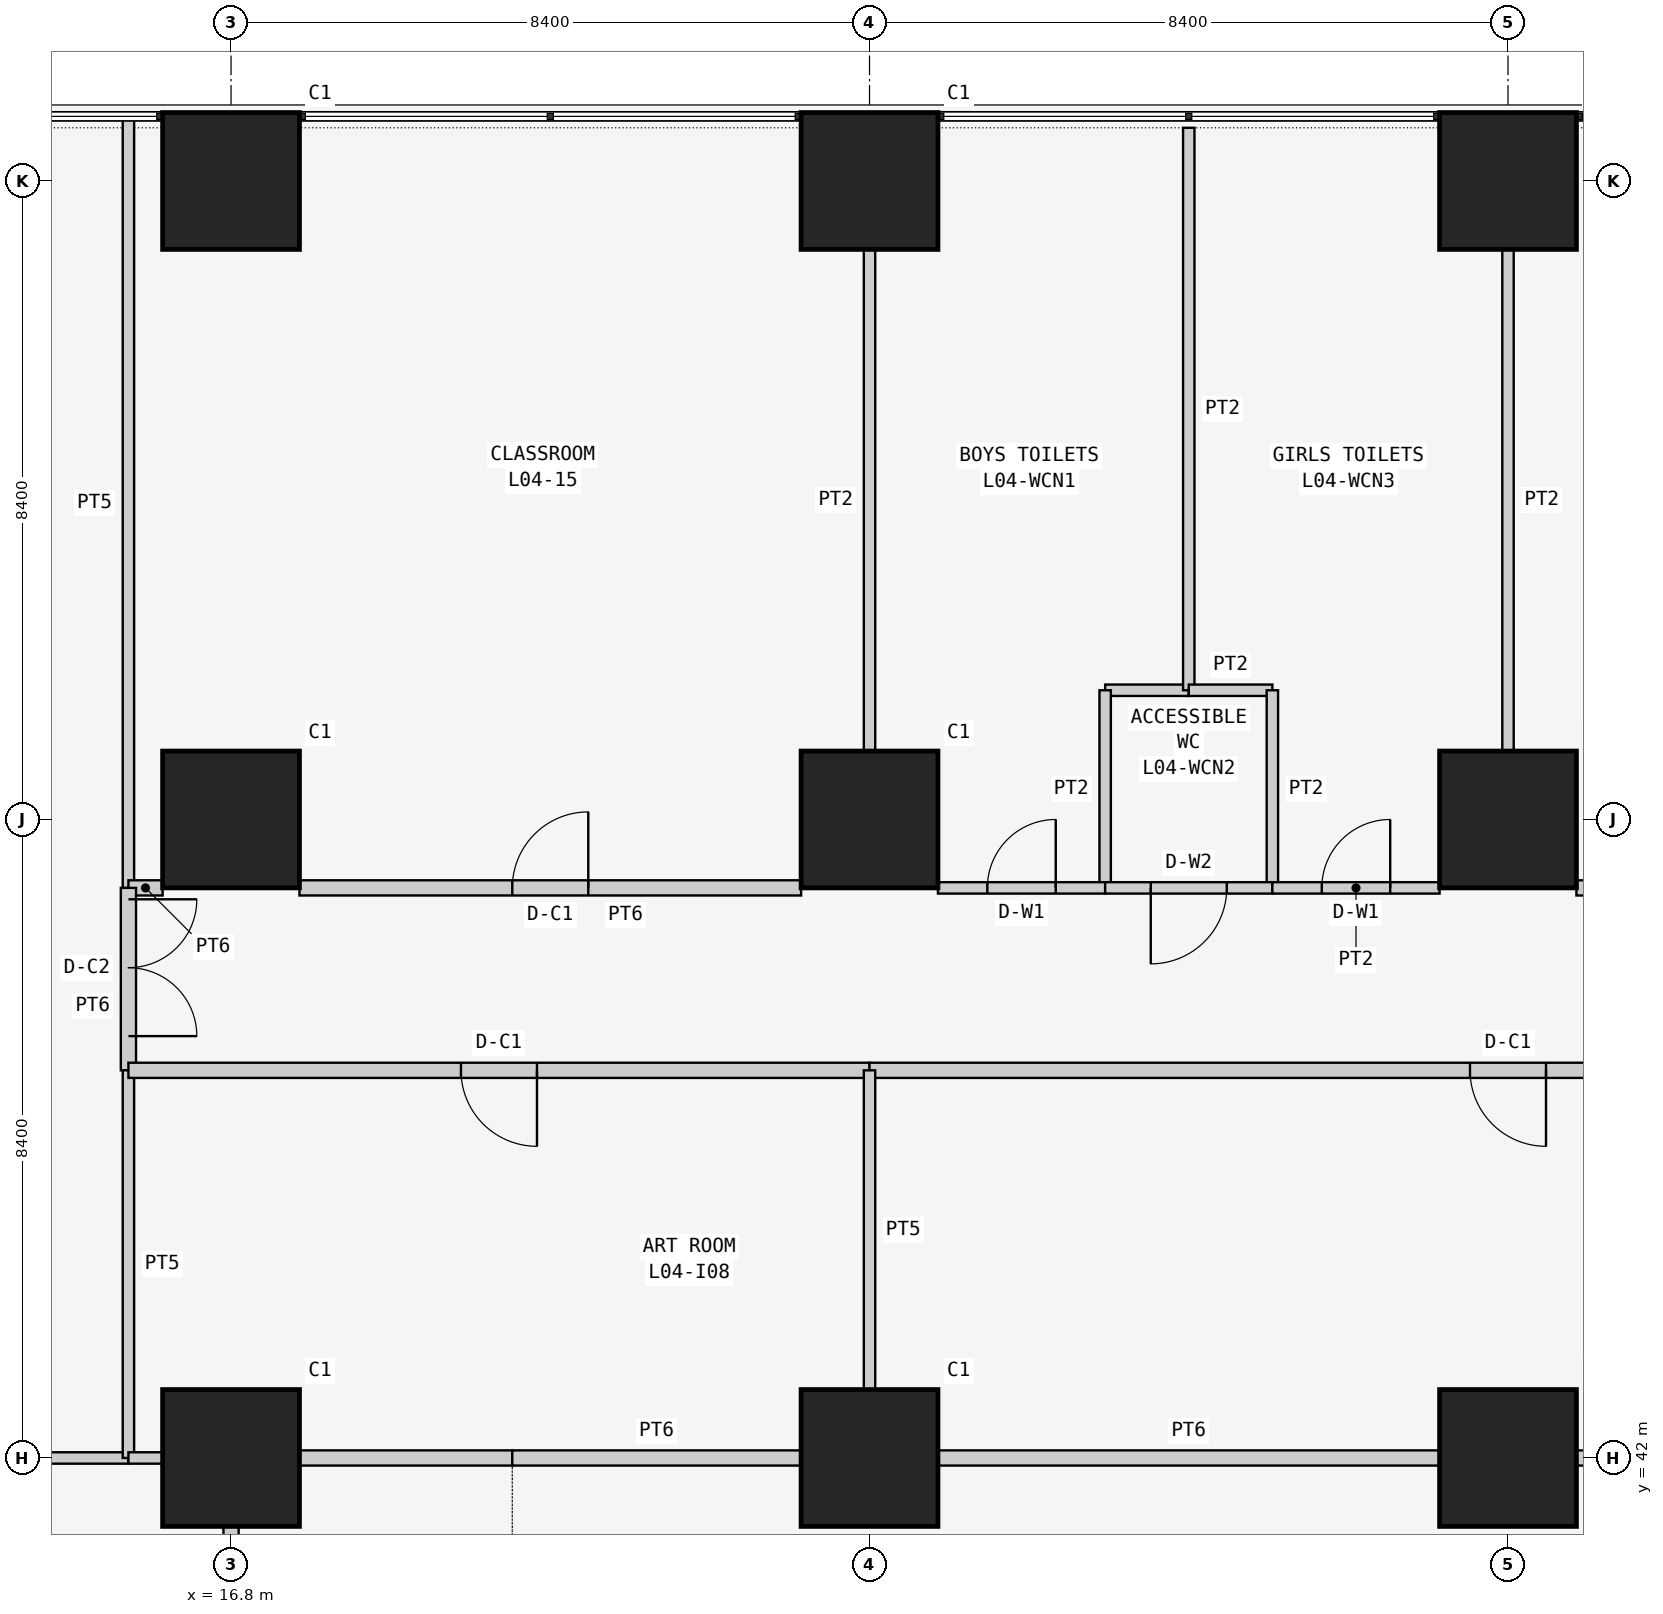
"""IFC4 building model, lengths in metres.
Left out: names, types, materials, properties, quantities, classifications, styles, units other than length and angle.
Written with IfcOpenShell. Run it as: python <this file> out.ifc"""

import sys

from ifc_helpers import new_model, si_unit, direction, frame, frame_2d, origin, origin_2d, place, context, subcontext, project, spatial, rectangle, extrude, element, fill, save


model = new_model("IFC4")
c1 = context("Model", 3, precision=1e-05, world=origin(), true_north=direction((0.0, 1.0)))
c2 = subcontext(c1, "Body", "Model", "MODEL_VIEW")
j1 = project(units=[si_unit("LENGTHUNIT", "METRE"), si_unit("PLANEANGLEUNIT", "RADIAN")], contexts=[c1])
p1 = place(None, origin())
s1 = spatial("IfcSite", under=j1, at=p1, CompositionType="ELEMENT")
p2 = place(p1, origin())
s2 = spatial("IfcBuilding", under=s1, at=p2, CompositionType="ELEMENT")
p3 = place(p2, frame((0.0, 0.0, 19.5)))
s3 = spatial("IfcBuildingStorey", under=s2, at=p3, CompositionType="ELEMENT", Elevation=19.5)
for number, where, z_axis, x_axis in (
    (1, (16.8, 42.0, 0.0), (0.0, 0.0, 1.0), (1.0, 0.0, 0.0)),
    (2, (16.8, 50.4, 0.0), (0.0, 0.0, 1.0), (1.0, 0.0, 0.0)),
    (3, (16.8, 58.8, 0.0), (0.0, 0.0, 1.0), (1.0, 0.0, 0.0)),
    (4, (25.2, 42.0, 0.0), (0.0, 0.0, 1.0), (1.0, 0.0, 0.0)),
    (5, (25.2, 50.4, 0.0), (0.0, 0.0, 1.0), (1.0, 0.0, 0.0)),
    (6, (25.2, 58.8, 0.0), (0.0, 0.0, 1.0), (1.0, 0.0, 0.0)),
    (7, (33.6, 42.0, 0.0), (0.0, 0.0, 1.0), (1.0, 0.0, 0.0)),
    (8, (33.6, 50.4, 0.0), (0.0, 0.0, 1.0), (1.0, 0.0, 0.0)),
    (9, (33.6, 58.8, 0.0), (0.0, 0.0, 1.0), (1.0, 0.0, 0.0)),
):
    element("IfcColumn", number, at=place(p3, frame(where, z_axis=z_axis, x_axis=x_axis)), inside=s3, PredefinedType="COLUMN", context=c2, shape_type="SweptSolid", body=[
        extrude(rectangle(XDim=1.8, YDim=1.8, at=origin_2d()), origin(), (0.0, 0.0, 1.0), 4.5),
    ])
p4 = place(p3, frame((29.4, 52.1, 0.0), z_axis=(0.0, 0.0, 1.0), x_axis=(-1.0, 0.0, 0.0)))
e10 = element("IfcWall", 10, at=p4, inside=s3, PredefinedType="PARTITIONING", context=c2, shape_type="SweptSolid", body=[
    extrude(rectangle(XDim=1.1, YDim=0.15, at=frame_2d((0.55, 0.0))), origin(), (0.0, 0.0, 1.0), 4.3),
])
p5 = place(p3, frame((28.3, 52.1, 0.0), z_axis=(0.0, 0.0, 1.0), x_axis=(0.0, -1.0, 0.0)))
e11 = element("IfcWall", 11, at=p5, inside=s3, PredefinedType="PARTITIONING", context=c2, shape_type="SweptSolid", body=[
    extrude(rectangle(XDim=2.6, YDim=0.15, at=frame_2d((1.3, 0.0))), origin(), (0.0, 0.0, 1.0), 4.3),
])
p6 = place(p3, frame((29.4, 59.5, 0.0), z_axis=(0.0, 0.0, 1.0), x_axis=(0.0, -1.0, 0.0)))
e12 = element("IfcWall", 12, at=p6, inside=s3, PredefinedType="PARTITIONING", context=c2, shape_type="SweptSolid", body=[
    extrude(rectangle(XDim=7.4, YDim=0.15, at=frame_2d((3.7, 0.0))), origin(), (0.0, 0.0, 1.0), 3.688),
])
p7 = place(p3, frame((25.2, 51.3, 0.0), z_axis=(0.0, 0.0, 1.0), x_axis=(0.0, 1.0, 0.0)))
e13 = element("IfcWall", 13, at=p7, inside=s3, PredefinedType="PARTITIONING", context=c2, shape_type="SweptSolid", body=[
    extrude(rectangle(XDim=6.6, YDim=0.15, at=frame_2d((3.3, 0.0))), origin(), (0.0, 0.0, 1.0), 3.543),
])
p8 = place(p3, frame((28.3, 49.5, 0.0), z_axis=(0.0, 0.0, 1.0), x_axis=(-1.0, 0.0, 0.0)))
e14 = element("IfcWall", 14, at=p8, inside=s3, PredefinedType="PARTITIONING", context=c2, shape_type="SweptSolid", body=[
    extrude(rectangle(XDim=2.2, YDim=0.15, at=frame_2d((1.1, 0.0))), origin(), (0.0, 0.0, 1.0), 4.3),
])
p9 = place(p8, frame((0.65, 0.0, 0.0)))
e15 = element("IfcOpeningElement", 15, at=p9, cuts=e14, PredefinedType="OPENING", context=c2, shape_type="SweptSolid", body=[
    extrude(rectangle(XDim=0.9, YDim=2.1, at=frame_2d((0.45, 1.05))), frame((0.0, 0.085, 0.0), z_axis=(0.0, -1.0, 0.0), x_axis=(1.0, 0.0, 0.0)), (0.0, 0.0, 1.0), 0.17),
])
p10 = place(p3, frame((29.4, 52.1, 0.0), z_axis=(0.0, 0.0, 1.0), x_axis=(1.0, 0.0, 0.0)))
e16 = element("IfcWall", 16, at=p10, inside=s3, PredefinedType="PARTITIONING", context=c2, shape_type="SweptSolid", body=[
    extrude(rectangle(XDim=1.1, YDim=0.15, at=frame_2d((0.55, 0.0))), origin(), (0.0, 0.0, 1.0), 4.3),
])
p11 = place(p3, frame((30.5, 52.1, 0.0), z_axis=(0.0, 0.0, 1.0), x_axis=(0.0, -1.0, 0.0)))
e17 = element("IfcWall", 17, at=p11, inside=s3, PredefinedType="PARTITIONING", context=c2, shape_type="SweptSolid", body=[
    extrude(rectangle(XDim=2.6, YDim=0.15, at=frame_2d((1.3, 0.0))), origin(), (0.0, 0.0, 1.0), 4.3),
])
p12 = place(p3, frame((30.5, 49.5, 0.0), z_axis=(0.0, 0.0, 1.0), x_axis=(-1.0, 0.0, 0.0)))
e18 = element("IfcWall", 18, at=p12, inside=s3, PredefinedType="PARTITIONING", context=c2, shape_type="SweptSolid", body=[
    extrude(rectangle(XDim=2.2, YDim=0.15, at=frame_2d((1.1, 0.0))), origin(), (0.0, 0.0, 1.0), 4.3),
])
p13 = place(p12, frame((0.6, 0.0, 0.0)))
e19 = element("IfcOpeningElement", 19, at=p13, cuts=e18, PredefinedType="OPENING", context=c2, shape_type="SweptSolid", body=[
    extrude(rectangle(XDim=1.0, YDim=2.1, at=frame_2d((0.5, 1.05))), frame((0.0, 0.085, 0.0), z_axis=(0.0, -1.0, 0.0), x_axis=(1.0, 0.0, 0.0)), (0.0, 0.0, 1.0), 0.17),
])
p14 = place(p3, frame((33.6, 57.9, 0.0), z_axis=(0.0, 0.0, 1.0), x_axis=(0.0, -1.0, 0.0)))
e20 = element("IfcWall", 20, at=p14, inside=s3, PredefinedType="PARTITIONING", context=c2, shape_type="SweptSolid", body=[
    extrude(rectangle(XDim=6.6, YDim=0.15, at=frame_2d((3.3, 0.0))), origin(), (0.0, 0.0, 1.0), 3.543),
])
p15 = place(p3, frame((32.7, 49.5, 0.0), z_axis=(0.0, 0.0, 1.0), x_axis=(-1.0, 0.0, 0.0)))
e21 = element("IfcWall", 21, at=p15, inside=s3, PredefinedType="PARTITIONING", context=c2, shape_type="SweptSolid", body=[
    extrude(rectangle(XDim=2.2, YDim=0.15, at=frame_2d((1.1, 0.0))), origin(), (0.0, 0.0, 1.0), 4.3),
])
p16 = place(p15, frame((0.65, 0.0, 0.0)))
e22 = element("IfcOpeningElement", 22, at=p16, cuts=e21, PredefinedType="OPENING", context=c2, shape_type="SweptSolid", body=[
    extrude(rectangle(XDim=0.9, YDim=2.1, at=frame_2d((0.45, 1.05))), frame((0.0, 0.085, 0.0), z_axis=(0.0, -1.0, 0.0), x_axis=(1.0, 0.0, 0.0)), (0.0, 0.0, 1.0), 0.17),
])
p17 = place(p3, frame((15.45, 49.5, 0.0), z_axis=(0.0, 0.0, 1.0), x_axis=(0.0, 1.0, 0.0)))
e23 = element("IfcWall", 23, at=p17, inside=s3, PredefinedType="PARTITIONING", context=c2, shape_type="SweptSolid", body=[
    extrude(rectangle(XDim=10.126, YDim=0.15, at=frame_2d((5.063, 0.0))), origin(), (0.0, 0.0, 1.0), 4.3),
])
p18 = place(p3, frame((15.9, 49.5, 0.0), z_axis=(0.0, 0.0, 1.0), x_axis=(-1.0, 0.0, 0.0)))
e24 = element("IfcWall", 24, at=p18, inside=s3, PredefinedType="PARTITIONING", context=c2, shape_type="SweptSolid", body=[
    extrude(rectangle(XDim=0.45, YDim=0.2, at=frame_2d((0.225, 0.0))), origin(), (0.0, 0.0, 1.0), 4.3),
])
p19 = place(p3, frame((24.3, 49.5, 0.0), z_axis=(0.0, 0.0, 1.0), x_axis=(-1.0, 0.0, 0.0)))
e25 = element("IfcWall", 25, at=p19, inside=s3, PredefinedType="PARTITIONING", context=c2, shape_type="SweptSolid", body=[
    extrude(rectangle(XDim=6.6, YDim=0.2, at=frame_2d((3.3, 0.0))), origin(), (0.0, 0.0, 1.0), 4.3),
])
p20 = place(p19, frame((2.8, 0.0, 0.0)))
e26 = element("IfcOpeningElement", 26, at=p20, cuts=e25, PredefinedType="OPENING", context=c2, shape_type="SweptSolid", body=[
    extrude(rectangle(XDim=1.0, YDim=2.1, at=frame_2d((0.5, 1.05))), frame((0.0, 0.11, 0.0), z_axis=(0.0, -1.0, 0.0), x_axis=(1.0, 0.0, 0.0)), (0.0, 0.0, 1.0), 0.22),
])
p21 = place(p3, frame((41.1, 49.5, 0.0), z_axis=(0.0, 0.0, 1.0), x_axis=(-1.0, 0.0, 0.0)))
e27 = element("IfcWall", 27, at=p21, inside=s3, PredefinedType="PARTITIONING", context=c2, shape_type="SweptSolid", body=[
    extrude(rectangle(XDim=6.6, YDim=0.2, at=frame_2d((3.3, 0.0))), origin(), (0.0, 0.0, 1.0), 4.3),
])
p22 = place(p21, frame((2.8, 0.0, 0.0)))
e28 = element("IfcOpeningElement", 28, at=p22, cuts=e27, PredefinedType="OPENING", context=c2, shape_type="SweptSolid", body=[
    extrude(rectangle(XDim=1.0, YDim=2.1, at=frame_2d((0.5, 1.05))), frame((0.0, 0.11, 0.0), z_axis=(0.0, -1.0, 0.0), x_axis=(1.0, 0.0, 0.0)), (0.0, 0.0, 1.0), 0.22),
])
p23 = place(p3, frame((15.45, 49.5, 0.0), z_axis=(0.0, 0.0, 1.0), x_axis=(0.0, -1.0, 0.0)))
e29 = element("IfcWall", 29, at=p23, inside=s3, PredefinedType="PARTITIONING", context=c2, shape_type="SweptSolid", body=[
    extrude(rectangle(XDim=2.4, YDim=0.2, at=frame_2d((1.2, 0.0))), origin(), (0.0, 0.0, 1.0), 4.3),
])
p24 = place(p23, frame((0.15, 0.0, 0.0)))
e30 = element("IfcOpeningElement", 30, at=p24, cuts=e29, PredefinedType="OPENING", context=c2, shape_type="SweptSolid", body=[
    extrude(rectangle(XDim=1.8, YDim=2.4, at=frame_2d((0.9, 1.2))), frame((0.0, 0.11, 0.0), z_axis=(0.0, -1.0, 0.0), x_axis=(1.0, 0.0, 0.0)), (0.0, 0.0, 1.0), 0.22),
])
p25 = place(p3, frame((15.45, 42.0, 0.0), z_axis=(0.0, 0.0, 1.0), x_axis=(-1.0, 0.0, 0.0)))
e31 = element("IfcWall", 31, at=p25, inside=s3, PredefinedType="PARTITIONING", context=c2, shape_type="SweptSolid", body=[
    extrude(rectangle(XDim=3.75, YDim=0.15, at=frame_2d((1.875, 0.0))), origin(), (0.0, 0.0, 1.0), 3.543),
])
p26 = place(p3, frame((15.45, 47.1, 0.0), z_axis=(0.0, 0.0, 1.0), x_axis=(0.0, -1.0, 0.0)))
e32 = element("IfcWall", 32, at=p26, inside=s3, PredefinedType="PARTITIONING", context=c2, shape_type="SweptSolid", body=[
    extrude(rectangle(XDim=5.1, YDim=0.15, at=frame_2d((2.55, 0.0))), origin(), (0.0, 0.0, 1.0), 4.3),
])
p27 = place(p3, frame((25.2, 47.1, 0.0), z_axis=(0.0, 0.0, 1.0), x_axis=(-1.0, 0.0, 0.0)))
e33 = element("IfcWall", 33, at=p27, inside=s3, PredefinedType="PARTITIONING", context=c2, shape_type="SweptSolid", body=[
    extrude(rectangle(XDim=9.75, YDim=0.2, at=frame_2d((4.875, 0.0))), origin(), (0.0, 0.0, 1.0), 4.3),
])
p28 = place(p27, frame((4.375, 0.0, 0.0)))
e34 = element("IfcOpeningElement", 34, at=p28, cuts=e33, PredefinedType="OPENING", context=c2, shape_type="SweptSolid", body=[
    extrude(rectangle(XDim=1.0, YDim=2.1, at=frame_2d((0.5, 1.05))), frame((0.0, 0.11, 0.0), z_axis=(0.0, -1.0, 0.0), x_axis=(1.0, 0.0, 0.0)), (0.0, 0.0, 1.0), 0.22),
])
p29 = place(p3, frame((42.0, 47.1, 0.0), z_axis=(0.0, 0.0, 1.0), x_axis=(-1.0, 0.0, 0.0)))
e35 = element("IfcWall", 35, at=p29, inside=s3, PredefinedType="PARTITIONING", context=c2, shape_type="SweptSolid", body=[
    extrude(rectangle(XDim=16.8, YDim=0.2, at=frame_2d((8.4, 0.0))), origin(), (0.0, 0.0, 1.0), 4.3),
])
p30 = place(p29, frame((7.9, 0.0, 0.0)))
e36 = element("IfcOpeningElement", 36, at=p30, cuts=e35, PredefinedType="OPENING", context=c2, shape_type="SweptSolid", body=[
    extrude(rectangle(XDim=1.0, YDim=2.1, at=frame_2d((0.5, 1.05))), frame((0.0, 0.11, 0.0), z_axis=(0.0, -1.0, 0.0), x_axis=(1.0, 0.0, 0.0)), (0.0, 0.0, 1.0), 0.22),
])
p31 = place(p3, frame((16.8, 34.5, 0.0), z_axis=(0.0, 0.0, 1.0), x_axis=(0.0, 1.0, 0.0)))
e37 = element("IfcWall", 37, at=p31, inside=s3, PredefinedType="PARTITIONING", context=c2, shape_type="SweptSolid", body=[
    extrude(rectangle(XDim=6.6, YDim=0.2, at=frame_2d((3.3, 0.0))), origin(), (0.0, 0.0, 1.0), 3.543),
])
p32 = place(p3, frame((17.7, 42.0, 0.0), z_axis=(0.0, 0.0, 1.0), x_axis=(1.0, 0.0, 0.0)))
e38 = element("IfcWall", 38, at=p32, inside=s3, PredefinedType="PARTITIONING", context=c2, shape_type="SweptSolid", body=[
    extrude(rectangle(XDim=2.8, YDim=0.2, at=frame_2d((1.4, 0.0))), origin(), (0.0, 0.0, 1.0), 3.543),
])
p33 = place(p3, frame((20.5, 42.0, 0.0), z_axis=(0.0, 0.0, 1.0), x_axis=(1.0, 0.0, 0.0)))
e39 = element("IfcWall", 39, at=p33, inside=s3, PredefinedType="PARTITIONING", context=c2, shape_type="SweptSolid", body=[
    extrude(rectangle(XDim=3.8, YDim=0.2, at=frame_2d((1.9, 0.0))), origin(), (0.0, 0.0, 1.0), 3.543),
])
p34 = place(p3, frame((26.1, 42.0, 0.0), z_axis=(0.0, 0.0, 1.0), x_axis=(1.0, 0.0, 0.0)))
e40 = element("IfcWall", 40, at=p34, inside=s3, PredefinedType="PARTITIONING", context=c2, shape_type="SweptSolid", body=[
    extrude(rectangle(XDim=6.6, YDim=0.2, at=frame_2d((3.3, 0.0))), origin(), (0.0, 0.0, 1.0), 3.543),
])
p35 = place(p3, frame((34.5, 42.0, 0.0), z_axis=(0.0, 0.0, 1.0), x_axis=(1.0, 0.0, 0.0)))
e41 = element("IfcWall", 41, at=p35, inside=s3, PredefinedType="PARTITIONING", context=c2, shape_type="SweptSolid", body=[
    extrude(rectangle(XDim=6.6, YDim=0.2, at=frame_2d((3.3, 0.0))), origin(), (0.0, 0.0, 1.0), 3.543),
])
p36 = place(p3, frame((15.45, 42.0, 0.0), z_axis=(0.0, 0.0, 1.0), x_axis=(1.0, 0.0, 0.0)))
e42 = element("IfcWall", 42, at=p36, inside=s3, PredefinedType="PARTITIONING", context=c2, shape_type="SweptSolid", body=[
    extrude(rectangle(XDim=0.45, YDim=0.15, at=frame_2d((0.225, 0.0))), origin(), (0.0, 0.0, 1.0), 3.543),
])
p37 = place(p3, frame((25.2, 47.1, 0.0), z_axis=(0.0, 0.0, 1.0), x_axis=(0.0, -1.0, 0.0)))
e43 = element("IfcWall", 43, at=p37, inside=s3, PredefinedType="PARTITIONING", context=c2, shape_type="SweptSolid", body=[
    extrude(rectangle(XDim=4.2, YDim=0.15, at=frame_2d((2.1, 0.0))), origin(), (0.0, 0.0, 1.0), 3.543),
])
p38 = place(p9, frame((0.9, 0.0, 0.0), z_axis=(0.0, 0.0, 1.0), x_axis=(-1.0, 0.0, 0.0)))
e44 = element("IfcDoor", 44, at=p38, inside=s3, OperationType="SINGLE_SWING_RIGHT", PredefinedType="DOOR", context=c2, shape_type="SweptSolid", body=[
    extrude(rectangle(XDim=0.9, YDim=2.1, at=frame_2d((0.45, 1.05))), frame((0.0, 0.025, 0.0), z_axis=(0.0, -1.0, 0.0), x_axis=(1.0, 0.0, 0.0)), (0.0, 0.0, 1.0), 0.05),
])
fill(e15, e44)
p39 = place(p13, origin())
e45 = element("IfcDoor", 45, at=p39, inside=s3, OperationType="SINGLE_SWING_RIGHT", PredefinedType="DOOR", context=c2, shape_type="SweptSolid", body=[
    extrude(rectangle(XDim=1.0, YDim=2.1, at=frame_2d((0.5, 1.05))), frame((0.0, 0.025, 0.0), z_axis=(0.0, -1.0, 0.0), x_axis=(1.0, 0.0, 0.0)), (0.0, 0.0, 1.0), 0.05),
])
fill(e19, e45)
p40 = place(p16, frame((0.9, 0.0, 0.0), z_axis=(0.0, 0.0, 1.0), x_axis=(-1.0, 0.0, 0.0)))
e46 = element("IfcDoor", 46, at=p40, inside=s3, OperationType="SINGLE_SWING_RIGHT", PredefinedType="DOOR", context=c2, shape_type="SweptSolid", body=[
    extrude(rectangle(XDim=0.9, YDim=2.1, at=frame_2d((0.45, 1.05))), frame((0.0, 0.025, 0.0), z_axis=(0.0, -1.0, 0.0), x_axis=(1.0, 0.0, 0.0)), (0.0, 0.0, 1.0), 0.05),
])
fill(e22, e46)
p41 = place(p20, frame((1.0, 0.0, 0.0), z_axis=(0.0, 0.0, 1.0), x_axis=(-1.0, 0.0, 0.0)))
e47 = element("IfcDoor", 47, at=p41, inside=s3, OperationType="SINGLE_SWING_RIGHT", PredefinedType="DOOR", context=c2, shape_type="SweptSolid", body=[
    extrude(rectangle(XDim=1.0, YDim=2.1, at=frame_2d((0.5, 1.05))), frame((0.0, 0.025, 0.0), z_axis=(0.0, -1.0, 0.0), x_axis=(1.0, 0.0, 0.0)), (0.0, 0.0, 1.0), 0.05),
])
fill(e26, e47)
p42 = place(p24, origin())
e48 = element("IfcDoor", 48, at=p42, inside=s3, OperationType="DOUBLE_DOOR_SINGLE_SWING", PredefinedType="DOOR", context=c2, shape_type="SweptSolid", body=[
    extrude(rectangle(XDim=1.8, YDim=2.4, at=frame_2d((0.9, 1.2))), frame((0.0, 0.025, 0.0), z_axis=(0.0, -1.0, 0.0), x_axis=(1.0, 0.0, 0.0)), (0.0, 0.0, 1.0), 0.05),
])
fill(e30, e48)
p43 = place(p28, origin())
e49 = element("IfcDoor", 49, at=p43, inside=s3, OperationType="SINGLE_SWING_LEFT", PredefinedType="DOOR", context=c2, shape_type="SweptSolid", body=[
    extrude(rectangle(XDim=1.0, YDim=2.1, at=frame_2d((0.5, 1.05))), frame((0.0, 0.025, 0.0), z_axis=(0.0, -1.0, 0.0), x_axis=(1.0, 0.0, 0.0)), (0.0, 0.0, 1.0), 0.05),
])
fill(e34, e49)
p44 = place(p30, origin())
e50 = element("IfcDoor", 50, at=p44, inside=s3, OperationType="SINGLE_SWING_LEFT", PredefinedType="DOOR", context=c2, shape_type="SweptSolid", body=[
    extrude(rectangle(XDim=1.0, YDim=2.1, at=frame_2d((0.5, 1.05))), frame((0.0, 0.025, 0.0), z_axis=(0.0, -1.0, 0.0), x_axis=(1.0, 0.0, 0.0)), (0.0, 0.0, 1.0), 0.05),
])
fill(e36, e50)
save(model, sys.argv[1])
